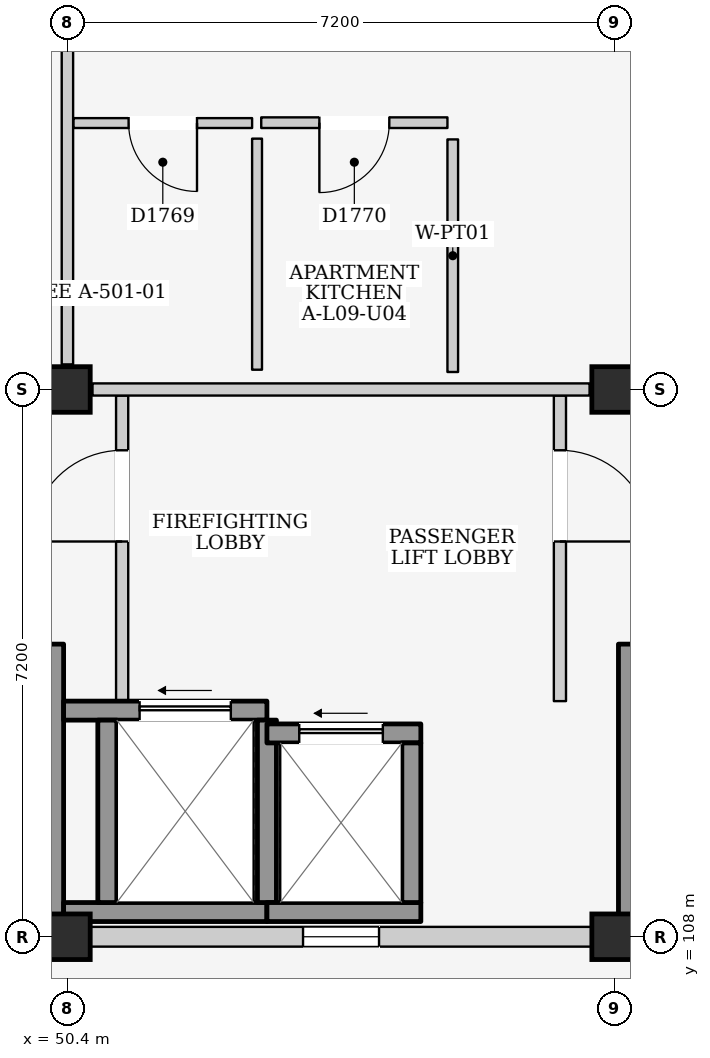
"""IFC4 building model, lengths in metres.
Left out: names, types, materials, properties, quantities, classifications, styles, units other than length and angle.
Written with IfcOpenShell. Run it as: python <this file> out.ifc"""

import sys

from ifc_helpers import new_model, si_unit, direction, frame, frame_2d, origin, origin_2d, place, context, subcontext, project, spatial, rectangle, extrude, element, fill, save


model = new_model("IFC4")
c1 = context("Model", 3, precision=1e-05, world=origin(), true_north=direction((0.0, 1.0)))
c2 = subcontext(c1, "Body", "Model", "MODEL_VIEW")
j1 = project(units=[si_unit("LENGTHUNIT", "METRE"), si_unit("PLANEANGLEUNIT", "RADIAN")], contexts=[c1])
p1 = place(None, origin())
s1 = spatial("IfcSite", under=j1, at=p1, CompositionType="ELEMENT")
p2 = place(p1, origin())
s2 = spatial("IfcBuilding", under=s1, at=p2, CompositionType="ELEMENT")
p3 = place(p2, frame((0.0, 0.0, 31.5)))
s3 = spatial("IfcBuildingStorey", under=s2, at=p3, CompositionType="ELEMENT", Elevation=31.5)
for number, where, z_axis, x_axis in (
    (1, (50.4, 108.0, 0.0), (0.0, 0.0, 1.0), (1.0, 0.0, 0.0)),
    (2, (50.4, 115.2, 0.0), (0.0, 0.0, 1.0), (1.0, 0.0, 0.0)),
    (3, (57.6, 108.0, 0.0), (0.0, 0.0, 1.0), (1.0, 0.0, 0.0)),
    (4, (57.6, 115.2, 0.0), (0.0, 0.0, 1.0), (1.0, 0.0, 0.0)),
):
    element("IfcColumn", number, at=place(p3, frame(where, z_axis=z_axis, x_axis=x_axis)), inside=s3, PredefinedType="COLUMN", context=c2, shape_type="SweptSolid", body=[
        extrude(rectangle(XDim=0.6, YDim=0.6, at=origin_2d()), origin(), (0.0, 0.0, 1.0), 3.3),
    ])
p4 = place(p3, frame((50.7, 108.0, 0.0), z_axis=(0.0, 0.0, 1.0), x_axis=(1.0, 0.0, 0.0)))
e5 = element("IfcWall", 5, at=p4, inside=s3, PredefinedType="ELEMENTEDWALL", context=c2, shape_type="SweptSolid", body=[
    extrude(rectangle(XDim=6.6, YDim=0.26, at=frame_2d((3.3, 0.0))), origin(), (0.0, 0.0, 1.0), 2.415),
])
p5 = place(p4, frame((2.8, 0.0, 1.2)))
e6 = element("IfcOpeningElement", 6, at=p5, cuts=e5, PredefinedType="OPENING", context=c2, shape_type="SweptSolid", body=[
    extrude(rectangle(XDim=1.0, YDim=0.9, at=frame_2d((0.5, 0.45))), frame((0.0, 0.145, 0.0), z_axis=(0.0, -1.0, 0.0), x_axis=(1.0, 0.0, 0.0)), (0.0, 0.0, 1.0), 0.29),
])
p6 = place(p3, frame((50.2, 108.15, 0.0), z_axis=(0.0, 0.0, 1.0), x_axis=(0.0, 1.0, 0.0)))
e7 = element("IfcWall", 7, at=p6, inside=s3, PredefinedType="SHEAR", context=c2, shape_type="SweptSolid", body=[
    extrude(rectangle(XDim=3.7, YDim=0.3, at=frame_2d((1.85, 0.0))), origin(), (0.0, 0.0, 1.0), 3.08),
])
p7 = place(p3, frame((51.12, 111.1, 0.0), z_axis=(0.0, 0.0, 1.0), x_axis=(0.0, 1.0, 0.0)))
e8 = element("IfcWall", 8, at=p7, inside=s3, PredefinedType="PARTITIONING", context=c2, shape_type="SweptSolid", body=[
    extrude(rectangle(XDim=4.02, YDim=0.16, at=frame_2d((2.01, 0.0))), origin(), (0.0, 0.0, 1.0), 3.08),
])
p8 = place(p7, frame((2.1, 0.0, 0.0)))
e9 = element("IfcOpeningElement", 9, at=p8, cuts=e8, PredefinedType="OPENING", context=c2, shape_type="SweptSolid", body=[
    extrude(rectangle(XDim=1.2, YDim=2.2, at=frame_2d((0.6, 1.1))), frame((0.0, 0.095, 0.0), z_axis=(0.0, -1.0, 0.0), x_axis=(1.0, 0.0, 0.0)), (0.0, 0.0, 1.0), 0.19),
])
p9 = place(p3, frame((56.88, 111.1, 0.0), z_axis=(0.0, 0.0, 1.0), x_axis=(0.0, 1.0, 0.0)))
e10 = element("IfcWall", 10, at=p9, inside=s3, PredefinedType="PARTITIONING", context=c2, shape_type="SweptSolid", body=[
    extrude(rectangle(XDim=4.02, YDim=0.16, at=frame_2d((2.01, 0.0))), origin(), (0.0, 0.0, 1.0), 3.08),
])
p10 = place(p9, frame((2.1, 0.0, 0.0)))
e11 = element("IfcOpeningElement", 11, at=p10, cuts=e10, PredefinedType="OPENING", context=c2, shape_type="SweptSolid", body=[
    extrude(rectangle(XDim=1.2, YDim=2.2, at=frame_2d((0.6, 1.1))), frame((0.0, 0.095, 0.0), z_axis=(0.0, -1.0, 0.0), x_axis=(1.0, 0.0, 0.0)), (0.0, 0.0, 1.0), 0.19),
])
p11 = place(p3, frame((50.35, 108.325, 0.0), z_axis=(0.0, 0.0, 1.0), x_axis=(1.0, 0.0, 0.0)))
e12 = element("IfcWall", 12, at=p11, inside=s3, PredefinedType="SHEAR", context=c2, shape_type="SweptSolid", body=[
    extrude(rectangle(XDim=2.675, YDim=0.25, at=frame_2d((1.337, 0.0))), origin(), (0.0, 0.0, 1.0), 3.08),
])
p12 = place(p3, frame((50.35, 110.975, 0.0), z_axis=(0.0, 0.0, 1.0), x_axis=(1.0, 0.0, 0.0)))
e13 = element("IfcWall", 13, at=p12, inside=s3, PredefinedType="SHEAR", context=c2, shape_type="SweptSolid", body=[
    extrude(rectangle(XDim=2.675, YDim=0.25, at=frame_2d((1.337, 0.0))), origin(), (0.0, 0.0, 1.0), 3.08),
])
p13 = place(p12, frame((1.0, 0.0, 0.0)))
e14 = element("IfcOpeningElement", 14, at=p13, cuts=e13, PredefinedType="OPENING", context=c2, shape_type="SweptSolid", body=[
    extrude(rectangle(XDim=1.2, YDim=2.25, at=frame_2d((0.6, 1.125))), frame((0.0, 0.14, 0.0), z_axis=(0.0, -1.0, 0.0), x_axis=(1.0, 0.0, 0.0)), (0.0, 0.0, 1.0), 0.28),
])
for number, where, z_axis, x_axis in (
    (15, (50.925, 108.45, 0.0), (0.0, 0.0, 1.0), (0.0, 1.0, 0.0)),
    (16, (53.025, 108.45, 0.0), (0.0, 0.0, 1.0), (0.0, 1.0, 0.0)),
):
    element("IfcWall", number, at=place(p3, frame(where, z_axis=z_axis, x_axis=x_axis)), inside=s3, PredefinedType="SHEAR", context=c2, shape_type="SweptSolid", body=[
        extrude(rectangle(XDim=2.4, YDim=0.25, at=frame_2d((1.2, 0.0))), origin(), (0.0, 0.0, 1.0), 3.08),
    ])
p14 = place(p3, frame((53.025, 108.325, 0.0), z_axis=(0.0, 0.0, 1.0), x_axis=(1.0, 0.0, 0.0)))
e17 = element("IfcWall", 17, at=p14, inside=s3, PredefinedType="SHEAR", context=c2, shape_type="SweptSolid", body=[
    extrude(rectangle(XDim=2.025, YDim=0.25, at=frame_2d((1.013, 0.0))), origin(), (0.0, 0.0, 1.0), 3.08),
])
p15 = place(p3, frame((53.025, 110.675, 0.0), z_axis=(0.0, 0.0, 1.0), x_axis=(1.0, 0.0, 0.0)))
e18 = element("IfcWall", 18, at=p15, inside=s3, PredefinedType="SHEAR", context=c2, shape_type="SweptSolid", body=[
    extrude(rectangle(XDim=2.025, YDim=0.25, at=frame_2d((1.013, 0.0))), origin(), (0.0, 0.0, 1.0), 3.08),
])
p16 = place(p15, frame((0.425, 0.0, 0.0)))
e19 = element("IfcOpeningElement", 19, at=p16, cuts=e18, PredefinedType="OPENING", context=c2, shape_type="SweptSolid", body=[
    extrude(rectangle(XDim=1.1, YDim=2.15, at=frame_2d((0.55, 1.075))), frame((0.0, 0.14, 0.0), z_axis=(0.0, -1.0, 0.0), x_axis=(1.0, 0.0, 0.0)), (0.0, 0.0, 1.0), 0.28),
])
p17 = place(p3, frame((54.925, 108.45, 0.0), z_axis=(0.0, 0.0, 1.0), x_axis=(0.0, 1.0, 0.0)))
e20 = element("IfcWall", 20, at=p17, inside=s3, PredefinedType="SHEAR", context=c2, shape_type="SweptSolid", body=[
    extrude(rectangle(XDim=2.1, YDim=0.25, at=frame_2d((1.05, 0.0))), origin(), (0.0, 0.0, 1.0), 3.08),
])
p18 = place(p3, frame((57.8, 108.15, 0.0), z_axis=(0.0, 0.0, 1.0), x_axis=(0.0, 1.0, 0.0)))
e21 = element("IfcWall", 21, at=p18, inside=s3, PredefinedType="SHEAR", context=c2, shape_type="SweptSolid", body=[
    extrude(rectangle(XDim=3.7, YDim=0.3, at=frame_2d((1.85, 0.0))), origin(), (0.0, 0.0, 1.0), 3.08),
])
p19 = place(p3, frame((50.4, 115.53, 0.0), z_axis=(0.0, 0.0, 1.0), x_axis=(0.0, 1.0, 0.0)))
e22 = element("IfcWall", 22, at=p19, inside=s3, PredefinedType="PARTITIONING", context=c2, shape_type="SweptSolid", body=[
    extrude(rectangle(XDim=6.54, YDim=0.15, at=frame_2d((3.27, 0.0))), origin(), (0.0, 0.0, 1.0), 2.565),
])
p20 = place(p3, frame((50.73, 115.2, 0.0), z_axis=(0.0, 0.0, 1.0), x_axis=(1.0, 0.0, 0.0)))
e23 = element("IfcWall", 23, at=p20, inside=s3, PredefinedType="PARTITIONING", context=c2, shape_type="SweptSolid", body=[
    extrude(rectangle(XDim=6.54, YDim=0.16, at=frame_2d((3.27, 0.0))), origin(), (0.0, 0.0, 1.0), 2.415),
])
p21 = place(p3, frame((50.48, 118.705, 0.0), z_axis=(0.0, 0.0, 1.0), x_axis=(1.0, 0.0, 0.0)))
e24 = element("IfcWall", 24, at=p21, inside=s3, PredefinedType="PARTITIONING", context=c2, shape_type="SweptSolid", body=[
    extrude(rectangle(XDim=2.35, YDim=0.13, at=frame_2d((1.175, 0.0))), origin(), (0.0, 0.0, 1.0), 3.08),
])
p22 = place(p21, frame((0.725, 0.0, 0.0)))
e25 = element("IfcOpeningElement", 25, at=p22, cuts=e24, PredefinedType="OPENING", context=c2, shape_type="SweptSolid", body=[
    extrude(rectangle(XDim=0.9, YDim=2.1, at=frame_2d((0.45, 1.05))), frame((0.0, 0.08, 0.0), z_axis=(0.0, -1.0, 0.0), x_axis=(1.0, 0.0, 0.0)), (0.0, 0.0, 1.0), 0.16),
])
p23 = place(p3, frame((52.895, 115.46, 0.0), z_axis=(0.0, 0.0, 1.0), x_axis=(0.0, 1.0, 0.0)))
e26 = element("IfcWall", 26, at=p23, inside=s3, PredefinedType="PARTITIONING", context=c2, shape_type="SweptSolid", body=[
    extrude(rectangle(XDim=3.04, YDim=0.13, at=frame_2d((1.52, 0.0))), origin(), (0.0, 0.0, 1.0), 3.08),
])
p24 = place(p3, frame((52.95, 118.71, 0.0), z_axis=(0.0, 0.0, 1.0), x_axis=(1.0, 0.0, 0.0)))
e27 = element("IfcWall", 27, at=p24, inside=s3, PredefinedType="PARTITIONING", context=c2, shape_type="SweptSolid", body=[
    extrude(rectangle(XDim=2.45, YDim=0.14, at=frame_2d((1.225, 0.0))), origin(), (0.0, 0.0, 1.0), 3.08),
])
p25 = place(p24, frame((0.765, 0.0, 0.0)))
e28 = element("IfcOpeningElement", 28, at=p25, cuts=e27, PredefinedType="OPENING", context=c2, shape_type="SweptSolid", body=[
    extrude(rectangle(XDim=0.92, YDim=2.1, at=frame_2d((0.46, 1.05))), frame((0.0, 0.085, 0.0), z_axis=(0.0, -1.0, 0.0), x_axis=(1.0, 0.0, 0.0)), (0.0, 0.0, 1.0), 0.17),
])
p26 = place(p3, frame((55.47, 115.43, 0.0), z_axis=(0.0, 0.0, 1.0), x_axis=(0.0, 1.0, 0.0)))
e29 = element("IfcWall", 29, at=p26, inside=s3, PredefinedType="PARTITIONING", context=c2, shape_type="SweptSolid", body=[
    extrude(rectangle(XDim=3.06, YDim=0.14, at=frame_2d((1.53, 0.0))), origin(), (0.0, 0.0, 1.0), 3.08),
])
p27 = place(p5, origin())
e30 = element("IfcWindow", 30, at=p27, inside=s3, PartitioningType="SINGLE_PANEL", PredefinedType="WINDOW", context=c2, shape_type="SweptSolid", body=[
    extrude(rectangle(XDim=1.0, YDim=0.9, at=frame_2d((0.5, 0.45))), frame((0.0, 0.03, 0.0), z_axis=(0.0, -1.0, 0.0), x_axis=(1.0, 0.0, 0.0)), (0.0, 0.0, 1.0), 0.06),
])
fill(e6, e30)
p28 = place(p8, origin())
e31 = element("IfcDoor", 31, at=p28, inside=s3, OperationType="SINGLE_SWING_LEFT", PredefinedType="DOOR", context=c2, shape_type="SweptSolid", body=[
    extrude(rectangle(XDim=1.2, YDim=2.2, at=frame_2d((0.6, 1.1))), frame((0.0, 0.025, 0.0), z_axis=(0.0, -1.0, 0.0), x_axis=(1.0, 0.0, 0.0)), (0.0, 0.0, 1.0), 0.05),
])
fill(e9, e31)
p29 = place(p10, frame((1.2, 0.0, 0.0), z_axis=(0.0, 0.0, 1.0), x_axis=(-1.0, 0.0, 0.0)))
e32 = element("IfcDoor", 32, at=p29, inside=s3, OperationType="SINGLE_SWING_RIGHT", PredefinedType="DOOR", context=c2, shape_type="SweptSolid", body=[
    extrude(rectangle(XDim=1.2, YDim=2.2, at=frame_2d((0.6, 1.1))), frame((0.0, 0.025, 0.0), z_axis=(0.0, -1.0, 0.0), x_axis=(1.0, 0.0, 0.0)), (0.0, 0.0, 1.0), 0.05),
])
fill(e11, e32)
p30 = place(p13, origin())
e33 = element("IfcDoor", 33, at=p30, inside=s3, OperationType="SLIDING_TO_LEFT", PredefinedType="DOOR", context=c2, shape_type="SweptSolid", body=[
    extrude(rectangle(XDim=1.2, YDim=2.25, at=frame_2d((0.6, 1.125))), frame((0.0, 0.025, 0.0), z_axis=(0.0, -1.0, 0.0), x_axis=(1.0, 0.0, 0.0)), (0.0, 0.0, 1.0), 0.05),
])
fill(e14, e33)
p31 = place(p16, origin())
e34 = element("IfcDoor", 34, at=p31, inside=s3, OperationType="SLIDING_TO_LEFT", PredefinedType="DOOR", context=c2, shape_type="SweptSolid", body=[
    extrude(rectangle(XDim=1.1, YDim=2.15, at=frame_2d((0.55, 1.075))), frame((0.0, 0.025, 0.0), z_axis=(0.0, -1.0, 0.0), x_axis=(1.0, 0.0, 0.0)), (0.0, 0.0, 1.0), 0.05),
])
fill(e19, e34)
p32 = place(p22, frame((0.9, 0.0, 0.0), z_axis=(0.0, 0.0, 1.0), x_axis=(-1.0, 0.0, 0.0)))
e35 = element("IfcDoor", 35, at=p32, inside=s3, OperationType="SINGLE_SWING_LEFT", PredefinedType="DOOR", context=c2, shape_type="SweptSolid", body=[
    extrude(rectangle(XDim=0.9, YDim=2.1, at=frame_2d((0.45, 1.05))), frame((0.0, 0.025, 0.0), z_axis=(0.0, -1.0, 0.0), x_axis=(1.0, 0.0, 0.0)), (0.0, 0.0, 1.0), 0.05),
])
fill(e25, e35)
p33 = place(p25, frame((0.92, 0.0, 0.0), z_axis=(0.0, 0.0, 1.0), x_axis=(-1.0, 0.0, 0.0)))
e36 = element("IfcDoor", 36, at=p33, inside=s3, OperationType="SINGLE_SWING_RIGHT", PredefinedType="DOOR", context=c2, shape_type="SweptSolid", body=[
    extrude(rectangle(XDim=0.92, YDim=2.1, at=frame_2d((0.46, 1.05))), frame((0.0, 0.025, 0.0), z_axis=(0.0, -1.0, 0.0), x_axis=(1.0, 0.0, 0.0)), (0.0, 0.0, 1.0), 0.05),
])
fill(e28, e36)
save(model, sys.argv[1])
